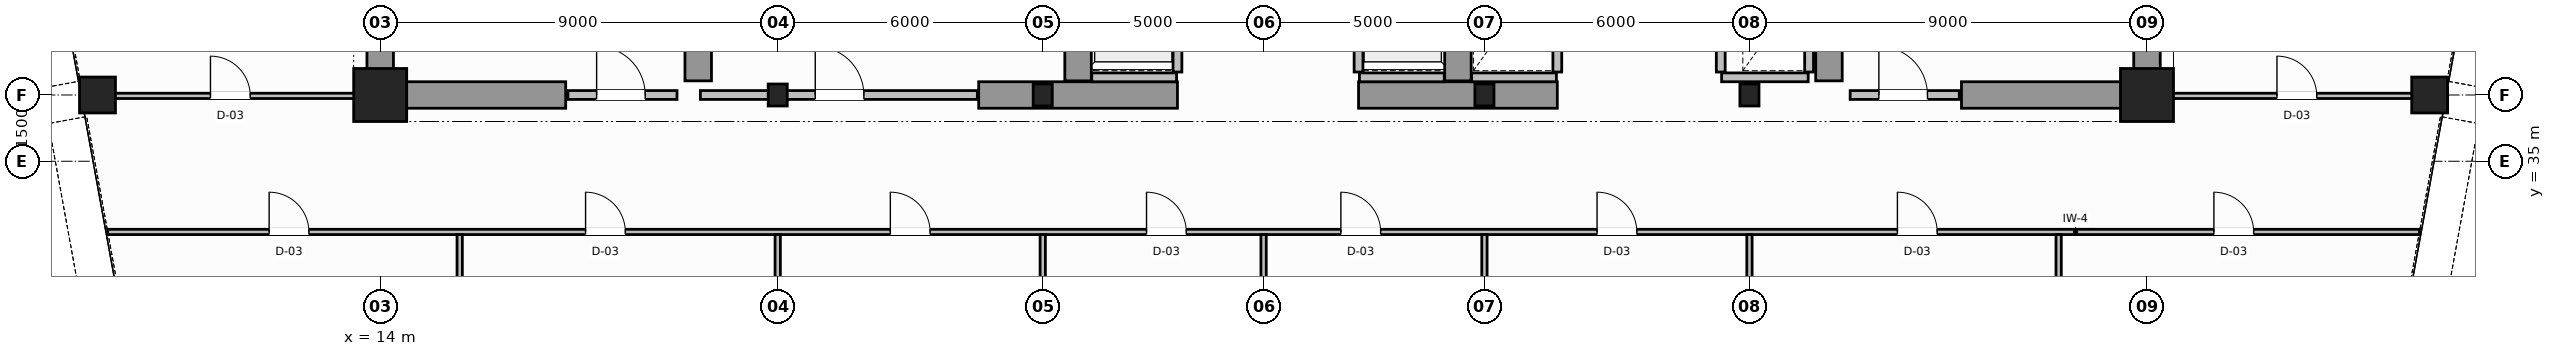
"""IFC4 building model, lengths in metres.
Left out: names, types, materials, properties, quantities, classifications, styles, units other than length and angle.
Written with IfcOpenShell. Run it as: python <this file> out.ifc"""

import sys

from ifc_helpers import new_model, si_unit, direction, frame, frame_2d, origin, origin_2d, place, context, subcontext, project, spatial, rectangle, hollow_circle, i_section, extrude, source, transform, mapped, element, fill, save


model = new_model("IFC4")
c1 = context("Model", 3, precision=1e-05, world=origin(), true_north=direction((0.0, 1.0)))
c2 = subcontext(c1, "Body", "Model", "MODEL_VIEW")
j1 = project(units=[si_unit("LENGTHUNIT", "METRE"), si_unit("PLANEANGLEUNIT", "RADIAN")], contexts=[c1])
p1 = place(None, origin())
s1 = spatial("IfcSite", under=j1, at=p1, CompositionType="ELEMENT")
p2 = place(p1, origin())
s2 = spatial("IfcBuilding", under=s1, at=p2, CompositionType="ELEMENT")
p3 = place(p2, frame((0.0, 0.0, 176.6)))
s3 = spatial("IfcBuildingStorey", under=s2, at=p3, CompositionType="ELEMENT", Elevation=176.6)
m1 = source(origin(), c2, "Body", "SweptSolid", [
    extrude(rectangle(XDim=1.2, YDim=1.2, at=origin_2d()), origin(), (0.0, 0.0, 1.0), 3.8),
])
p4 = place(p3, frame((14.0, 36.5, 0.0), z_axis=(0.0, 0.0, 1.0), x_axis=(1.0, 0.0, 0.0)))
e1 = element("IfcColumn", 1, at=p4, inside=s3, PredefinedType="COLUMN", context=c2, shape_type="MappedRepresentation", body=[
    mapped(m1, transform((0.0, 0.0, 0.0), scale=1.0)),
])
m2 = source(origin(), c2, "Body", "SweptSolid", [
    extrude(i_section(OverallWidth=0.432, OverallDepth=0.498, WebThickness=0.055, FlangeThickness=0.068, FilletRadius=0.015, at=origin_2d()), origin(), (0.0, 0.0, 1.0), 3.8),
])
for number, where, z_axis, x_axis in (
    (2, (23.0, 36.5, 0.0), (0.0, 0.0, 1.0), (1.0, 0.0, 0.0)),
    (3, (29.0, 36.5, 0.0), (0.0, 0.0, 1.0), (1.0, 0.0, 0.0)),
    (4, (39.0, 36.5, 0.0), (0.0, 0.0, 1.0), (1.0, 0.0, 0.0)),
    (5, (45.0, 36.5, 0.0), (0.0, 0.0, 1.0), (1.0, 0.0, 0.0)),
):
    element("IfcColumn", number, at=place(p3, frame(where, z_axis=z_axis, x_axis=x_axis)), inside=s3, PredefinedType="COLUMN", context=c2, shape_type="MappedRepresentation", body=[
        mapped(m2, transform((0.0, 0.0, 0.0), scale=1.0)),
    ])
p5 = place(p3, frame((54.0, 36.5, 0.0), z_axis=(0.0, 0.0, 1.0), x_axis=(1.0, 0.0, 0.0)))
e6 = element("IfcColumn", 6, at=p5, inside=s3, PredefinedType="COLUMN", context=c2, shape_type="MappedRepresentation", body=[
    mapped(m1, transform((0.0, 0.0, 0.0), scale=1.0)),
])
m3 = source(origin(), c2, "Body", "SweptSolid", [
    extrude(hollow_circle(Radius=0.406, WallThickness=0.04, at=origin_2d()), origin(), (0.0, 0.0, 1.0), 3.8),
])
for number, where, z_axis, x_axis in (
    (7, (7.6, 36.5, 0.0), (0.0, 0.0, 1.0), (1.0, 0.0, 0.0)),
    (8, (60.4, 36.5, 0.0), (0.0, 0.0, 1.0), (1.0, 0.0, 0.0)),
):
    element("IfcColumn", number, at=place(p3, frame(where, z_axis=z_axis, x_axis=x_axis)), inside=s3, PredefinedType="COLUMN", context=c2, shape_type="MappedRepresentation", body=[
        mapped(m3, transform((0.0, 0.0, 0.0), scale=1.0)),
    ])
for number, where, z_axis, x_axis in (
    (9, (14.0, 36.5, 0.0), (0.0, 0.0, 1.0), (0.0, 1.0, 0.0)),
    (10, (54.0, 36.5, 0.0), (0.0, 0.0, 1.0), (0.0, 1.0, 0.0)),
):
    element("IfcWall", number, at=place(p3, frame(where, z_axis=z_axis, x_axis=x_axis)), inside=s3, PredefinedType="SHEAR", context=c2, shape_type="SweptSolid", body=[
        extrude(rectangle(XDim=14.5, YDim=0.6, at=frame_2d((7.25, 0.0))), origin(), (0.0, 0.0, 1.0), 3.8),
    ])
p6 = place(p3, frame((14.32, 36.5, 0.0), z_axis=(0.0, 0.0, 1.0), x_axis=(1.0, 0.0, 0.0)))
e11 = element("IfcWall", 11, at=p6, inside=s3, PredefinedType="SHEAR", context=c2, shape_type="SweptSolid", body=[
    extrude(rectangle(XDim=3.88, YDim=0.6, at=frame_2d((1.94, 0.0))), origin(), (0.0, 0.0, 1.0), 2.58),
])
for number, where, z_axis, x_axis in (
    (12, (27.55, 36.5, 0.0), (0.0, 0.0, 1.0), (1.0, 0.0, 0.0)),
    (13, (36.15, 36.5, 0.0), (0.0, 0.0, 1.0), (1.0, 0.0, 0.0)),
):
    element("IfcWall", number, at=place(p3, frame(where, z_axis=z_axis, x_axis=x_axis)), inside=s3, PredefinedType="SHEAR", context=c2, shape_type="SweptSolid", body=[
        extrude(rectangle(XDim=4.5, YDim=0.6, at=frame_2d((2.25, 0.0))), origin(), (0.0, 0.0, 1.0), 3.8),
    ])
p7 = place(p3, frame((49.8, 36.5, 0.0), z_axis=(0.0, 0.0, 1.0), x_axis=(1.0, 0.0, 0.0)))
e14 = element("IfcWall", 14, at=p7, inside=s3, PredefinedType="SHEAR", context=c2, shape_type="SweptSolid", body=[
    extrude(rectangle(XDim=3.88, YDim=0.6, at=frame_2d((1.94, 0.0))), origin(), (0.0, 0.0, 1.0), 2.58),
])
for number, where, z_axis, x_axis in (
    (15, (21.2, 36.82, 0.0), (0.0, 0.0, 1.0), (0.0, 1.0, 0.0)),
    (16, (29.8, 36.82, 0.0), (0.0, 0.0, 1.0), (0.0, 1.0, 0.0)),
    (17, (38.4, 36.82, 0.0), (0.0, 0.0, 1.0), (0.0, 1.0, 0.0)),
    (18, (46.8, 36.82, 0.0), (0.0, 0.0, 1.0), (0.0, 1.0, 0.0)),
):
    element("IfcWall", number, at=place(p3, frame(where, z_axis=z_axis, x_axis=x_axis)), inside=s3, PredefinedType="SHEAR", context=c2, shape_type="SweptSolid", body=[
        extrude(rectangle(XDim=9.38, YDim=0.6, at=frame_2d((4.69, 0.0))), origin(), (0.0, 0.0, 1.0), 3.8),
    ])
p8 = place(p3, frame((18.25, 36.5, 0.0), z_axis=(0.0, 0.0, 1.0), x_axis=(1.0, 0.0, 0.0)))
e19 = element("IfcWall", 19, at=p8, inside=s3, PredefinedType="SOLIDWALL", context=c2, shape_type="SweptSolid", body=[
    extrude(rectangle(XDim=2.47, YDim=0.2, at=frame_2d((1.235, 0.0))), origin(), (0.0, 0.0, 1.0), 2.57),
])
p9 = place(p8, frame((0.65, 0.0, 0.0)))
e20 = element("IfcOpeningElement", 20, at=p9, cuts=e19, PredefinedType="OPENING", context=c2, shape_type="SweptSolid", body=[
    extrude(rectangle(XDim=1.1, YDim=2.15, at=frame_2d((0.55, 1.075))), frame((0.0, 0.11, 0.0), z_axis=(0.0, -1.0, 0.0), x_axis=(1.0, 0.0, 0.0)), (0.0, 0.0, 1.0), 0.22),
])
p10 = place(p3, frame((47.28, 36.5, 0.0), z_axis=(0.0, 0.0, 1.0), x_axis=(1.0, 0.0, 0.0)))
e21 = element("IfcWall", 21, at=p10, inside=s3, PredefinedType="SOLIDWALL", context=c2, shape_type="SweptSolid", body=[
    extrude(rectangle(XDim=2.47, YDim=0.2, at=frame_2d((1.235, 0.0))), origin(), (0.0, 0.0, 1.0), 2.57),
])
p11 = place(p10, frame((0.65, 0.0, 0.0)))
e22 = element("IfcOpeningElement", 22, at=p11, cuts=e21, PredefinedType="OPENING", context=c2, shape_type="SweptSolid", body=[
    extrude(rectangle(XDim=1.1, YDim=2.15, at=frame_2d((0.55, 1.075))), frame((0.0, 0.11, 0.0), z_axis=(0.0, -1.0, 0.0), x_axis=(1.0, 0.0, 0.0)), (0.0, 0.0, 1.0), 0.22),
])
p12 = place(p3, frame((30.11, 36.9, 0.0), z_axis=(0.0, 0.0, 1.0), x_axis=(1.0, 0.0, 0.0)))
e23 = element("IfcWall", 23, at=p12, inside=s3, PredefinedType="SOLIDWALL", context=c2, shape_type="SweptSolid", body=[
    extrude(rectangle(XDim=1.92, YDim=0.2, at=frame_2d((0.96, 0.0))), origin(), (0.0, 0.0, 1.0), 2.37),
])
p13 = place(p3, frame((32.05, 37.02, 0.0), z_axis=(0.0, 0.0, 1.0), x_axis=(0.0, 1.0, 0.0)))
e24 = element("IfcWall", 24, at=p13, inside=s3, PredefinedType="SOLIDWALL", context=c2, shape_type="SweptSolid", body=[
    extrude(rectangle(XDim=2.56, YDim=0.2, at=frame_2d((1.28, 0.0))), origin(), (0.0, 0.0, 1.0), 3.58),
])
p14 = place(p3, frame((36.17, 36.9, 0.0), z_axis=(0.0, 0.0, 1.0), x_axis=(1.0, 0.0, 0.0)))
e25 = element("IfcWall", 25, at=p14, inside=s3, PredefinedType="SOLIDWALL", context=c2, shape_type="SweptSolid", body=[
    extrude(rectangle(XDim=1.92, YDim=0.2, at=frame_2d((0.96, 0.0))), origin(), (0.0, 0.0, 1.0), 2.37),
])
p15 = place(p3, frame((36.15, 37.02, 0.0), z_axis=(0.0, 0.0, 1.0), x_axis=(0.0, 1.0, 0.0)))
e26 = element("IfcWall", 26, at=p15, inside=s3, PredefinedType="SOLIDWALL", context=c2, shape_type="SweptSolid", body=[
    extrude(rectangle(XDim=2.56, YDim=0.2, at=frame_2d((1.28, 0.0))), origin(), (0.0, 0.0, 1.0), 3.58),
])
p16 = place(p3, frame((38.71, 36.9, 0.0), z_axis=(0.0, 0.0, 1.0), x_axis=(1.0, 0.0, 0.0)))
e27 = element("IfcWall", 27, at=p16, inside=s3, PredefinedType="SOLIDWALL", context=c2, shape_type="SweptSolid", body=[
    extrude(rectangle(XDim=1.92, YDim=0.2, at=frame_2d((0.96, 0.0))), origin(), (0.0, 0.0, 1.0), 2.37),
])
p17 = place(p3, frame((40.65, 37.02, 0.0), z_axis=(0.0, 0.0, 1.0), x_axis=(0.0, 1.0, 0.0)))
e28 = element("IfcWall", 28, at=p17, inside=s3, PredefinedType="SOLIDWALL", context=c2, shape_type="SweptSolid", body=[
    extrude(rectangle(XDim=2.56, YDim=0.2, at=frame_2d((1.28, 0.0))), origin(), (0.0, 0.0, 1.0), 3.58),
])
p18 = place(p3, frame((44.37, 36.9, 0.0), z_axis=(0.0, 0.0, 1.0), x_axis=(1.0, 0.0, 0.0)))
e29 = element("IfcWall", 29, at=p18, inside=s3, PredefinedType="SOLIDWALL", context=c2, shape_type="SweptSolid", body=[
    extrude(rectangle(XDim=1.96, YDim=0.2, at=frame_2d((0.98, 0.0))), origin(), (0.0, 0.0, 1.0), 2.37),
])
for number, where, z_axis, x_axis in (
    (30, (44.35, 37.02, 0.0), (0.0, 0.0, 1.0), (0.0, 1.0, 0.0)),
    (31, (46.35, 37.02, 0.0), (0.0, 0.0, 1.0), (0.0, 1.0, 0.0)),
):
    element("IfcWall", number, at=place(p3, frame(where, z_axis=z_axis, x_axis=x_axis)), inside=s3, PredefinedType="SOLIDWALL", context=c2, shape_type="SweptSolid", body=[
        extrude(rectangle(XDim=2.56, YDim=0.2, at=frame_2d((1.28, 0.0))), origin(), (0.0, 0.0, 1.0), 3.58),
    ])
p19 = place(p3, frame((21.25, 36.5, 0.0), z_axis=(0.0, 0.0, 1.0), x_axis=(1.0, 0.0, 0.0)))
e32 = element("IfcWall", 32, at=p19, inside=s3, PredefinedType="SOLIDWALL", context=c2, shape_type="SweptSolid", body=[
    extrude(rectangle(XDim=6.27, YDim=0.2, at=frame_2d((3.135, 0.0))), origin(), (0.0, 0.0, 1.0), 2.37),
])
p20 = place(p19, frame((2.6, 0.0, 0.0)))
e33 = element("IfcOpeningElement", 33, at=p20, cuts=e32, PredefinedType="OPENING", context=c2, shape_type="SweptSolid", body=[
    extrude(rectangle(XDim=1.1, YDim=2.15, at=frame_2d((0.55, 1.075))), frame((0.0, 0.11, 0.0), z_axis=(0.0, -1.0, 0.0), x_axis=(1.0, 0.0, 0.0)), (0.0, 0.0, 1.0), 0.22),
])
p21 = place(p3, frame((7.831, 33.4, 0.0), z_axis=(0.0, 0.0, 1.0), x_axis=(1.0, 0.0, 0.0)))
e34 = element("IfcWall", 34, at=p21, inside=s3, PredefinedType="PARTITIONING", context=c2, shape_type="SweptSolid", body=[
    extrude(rectangle(XDim=52.338, YDim=0.12, at=frame_2d((26.169, 0.0))), origin(), (0.0, 0.0, 1.0), 3.58),
])
p22 = place(p21, frame((3.655, 0.0, 0.0)))
e35 = element("IfcOpeningElement", 35, at=p22, cuts=e34, PredefinedType="OPENING", context=c2, shape_type="SweptSolid", body=[
    extrude(rectangle(XDim=0.9, YDim=2.15, at=frame_2d((0.45, 1.075))), frame((0.0, 0.07, 0.0), z_axis=(0.0, -1.0, 0.0), x_axis=(1.0, 0.0, 0.0)), (0.0, 0.0, 1.0), 0.14),
])
p23 = place(p21, frame((10.819, 0.0, 0.0)))
e36 = element("IfcOpeningElement", 36, at=p23, cuts=e34, PredefinedType="OPENING", context=c2, shape_type="SweptSolid", body=[
    extrude(rectangle(XDim=0.9, YDim=2.15, at=frame_2d((0.45, 1.075))), frame((0.0, 0.07, 0.0), z_axis=(0.0, -1.0, 0.0), x_axis=(1.0, 0.0, 0.0)), (0.0, 0.0, 1.0), 0.14),
])
p24 = place(p21, frame((17.719, 0.0, 0.0)))
e37 = element("IfcOpeningElement", 37, at=p24, cuts=e34, PredefinedType="OPENING", context=c2, shape_type="SweptSolid", body=[
    extrude(rectangle(XDim=0.9, YDim=2.15, at=frame_2d((0.45, 1.075))), frame((0.0, 0.07, 0.0), z_axis=(0.0, -1.0, 0.0), x_axis=(1.0, 0.0, 0.0)), (0.0, 0.0, 1.0), 0.14),
])
p25 = place(p21, frame((23.519, 0.0, 0.0)))
e38 = element("IfcOpeningElement", 38, at=p25, cuts=e34, PredefinedType="OPENING", context=c2, shape_type="SweptSolid", body=[
    extrude(rectangle(XDim=0.9, YDim=2.15, at=frame_2d((0.45, 1.075))), frame((0.0, 0.07, 0.0), z_axis=(0.0, -1.0, 0.0), x_axis=(1.0, 0.0, 0.0)), (0.0, 0.0, 1.0), 0.14),
])
p26 = place(p21, frame((27.919, 0.0, 0.0)))
e39 = element("IfcOpeningElement", 39, at=p26, cuts=e34, PredefinedType="OPENING", context=c2, shape_type="SweptSolid", body=[
    extrude(rectangle(XDim=0.9, YDim=2.15, at=frame_2d((0.45, 1.075))), frame((0.0, 0.07, 0.0), z_axis=(0.0, -1.0, 0.0), x_axis=(1.0, 0.0, 0.0)), (0.0, 0.0, 1.0), 0.14),
])
p27 = place(p21, frame((33.719, 0.0, 0.0)))
e40 = element("IfcOpeningElement", 40, at=p27, cuts=e34, PredefinedType="OPENING", context=c2, shape_type="SweptSolid", body=[
    extrude(rectangle(XDim=0.9, YDim=2.15, at=frame_2d((0.45, 1.075))), frame((0.0, 0.07, 0.0), z_axis=(0.0, -1.0, 0.0), x_axis=(1.0, 0.0, 0.0)), (0.0, 0.0, 1.0), 0.14),
])
p28 = place(p21, frame((40.519, 0.0, 0.0)))
e41 = element("IfcOpeningElement", 41, at=p28, cuts=e34, PredefinedType="OPENING", context=c2, shape_type="SweptSolid", body=[
    extrude(rectangle(XDim=0.9, YDim=2.15, at=frame_2d((0.45, 1.075))), frame((0.0, 0.07, 0.0), z_axis=(0.0, -1.0, 0.0), x_axis=(1.0, 0.0, 0.0)), (0.0, 0.0, 1.0), 0.14),
])
p29 = place(p21, frame((47.684, 0.0, 0.0)))
e42 = element("IfcOpeningElement", 42, at=p29, cuts=e34, PredefinedType="OPENING", context=c2, shape_type="SweptSolid", body=[
    extrude(rectangle(XDim=0.9, YDim=2.15, at=frame_2d((0.45, 1.075))), frame((0.0, 0.07, 0.0), z_axis=(0.0, -1.0, 0.0), x_axis=(1.0, 0.0, 0.0)), (0.0, 0.0, 1.0), 0.14),
])
p30 = place(p3, frame((7.274, 36.48, 0.0), z_axis=(0.0, 0.0, 1.0), x_axis=(1.0, 0.0, 0.0)))
e43 = element("IfcWall", 43, at=p30, inside=s3, PredefinedType="PARTITIONING", context=c2, shape_type="SweptSolid", body=[
    extrude(rectangle(XDim=6.666, YDim=0.12, at=frame_2d((3.333, 0.0))), origin(), (0.0, 0.0, 1.0), 2.37),
])
p31 = place(p30, frame((2.883, 0.0, 0.0)))
e44 = element("IfcOpeningElement", 44, at=p31, cuts=e43, PredefinedType="OPENING", context=c2, shape_type="SweptSolid", body=[
    extrude(rectangle(XDim=0.9, YDim=2.15, at=frame_2d((0.45, 1.075))), frame((0.0, 0.07, 0.0), z_axis=(0.0, -1.0, 0.0), x_axis=(1.0, 0.0, 0.0)), (0.0, 0.0, 1.0), 0.14),
])
p32 = place(p3, frame((54.06, 36.48, 0.0), z_axis=(0.0, 0.0, 1.0), x_axis=(1.0, 0.0, 0.0)))
e45 = element("IfcWall", 45, at=p32, inside=s3, PredefinedType="PARTITIONING", context=c2, shape_type="SweptSolid", body=[
    extrude(rectangle(XDim=6.666, YDim=0.12, at=frame_2d((3.333, 0.0))), origin(), (0.0, 0.0, 1.0), 2.37),
])
p33 = place(p32, frame((2.883, 0.0, 0.0)))
e46 = element("IfcOpeningElement", 46, at=p33, cuts=e45, PredefinedType="OPENING", context=c2, shape_type="SweptSolid", body=[
    extrude(rectangle(XDim=0.9, YDim=2.15, at=frame_2d((0.45, 1.075))), frame((0.0, 0.07, 0.0), z_axis=(0.0, -1.0, 0.0), x_axis=(1.0, 0.0, 0.0)), (0.0, 0.0, 1.0), 0.14),
])
for number, where, z_axis, x_axis in (
    (47, (23.0, 28.14, 0.0), (0.0, 0.0, 1.0), (0.0, 1.0, 0.0)),
    (48, (29.0, 28.14, 0.0), (0.0, 0.0, 1.0), (0.0, 1.0, 0.0)),
    (49, (39.0, 28.14, 0.0), (0.0, 0.0, 1.0), (0.0, 1.0, 0.0)),
    (50, (45.0, 28.14, 0.0), (0.0, 0.0, 1.0), (0.0, 1.0, 0.0)),
):
    element("IfcWall", number, at=place(p3, frame(where, z_axis=z_axis, x_axis=x_axis)), inside=s3, PredefinedType="PARTITIONING", context=c2, shape_type="SweptSolid", body=[
        extrude(rectangle(XDim=5.2, YDim=0.12, at=frame_2d((2.6, 0.0))), origin(), (0.0, 0.0, 1.0), 2.37),
    ])
p34 = place(p3, frame((15.8, 18.64, 0.0), z_axis=(0.0, 0.0, 1.0), x_axis=(0.0, 1.0, 0.0)))
e51 = element("IfcWall", 51, at=p34, inside=s3, PredefinedType="PARTITIONING", context=c2, shape_type="SweptSolid", body=[
    extrude(rectangle(XDim=14.7, YDim=0.12, at=frame_2d((7.35, 0.0))), origin(), (0.0, 0.0, 1.0), 3.58),
])
p35 = place(p3, frame((34.0, 7.64, 0.0), z_axis=(0.0, 0.0, 1.0), x_axis=(0.0, 1.0, 0.0)))
e52 = element("IfcWall", 52, at=p35, inside=s3, PredefinedType="PARTITIONING", context=c2, shape_type="SweptSolid", body=[
    extrude(rectangle(XDim=25.7, YDim=0.12, at=frame_2d((12.85, 0.0))), origin(), (0.0, 0.0, 1.0), 3.58),
])
p36 = place(p3, frame((52.0, 18.64, 0.0), z_axis=(0.0, 0.0, 1.0), x_axis=(0.0, 1.0, 0.0)))
e53 = element("IfcWall", 53, at=p36, inside=s3, PredefinedType="PARTITIONING", context=c2, shape_type="SweptSolid", body=[
    extrude(rectangle(XDim=14.7, YDim=0.12, at=frame_2d((7.35, 0.0))), origin(), (0.0, 0.0, 1.0), 3.58),
])
m4 = source(origin(), c2, "Body", "SweptSolid", [
    extrude(rectangle(XDim=1.1, YDim=2.15, at=frame_2d((0.55, 1.075))), frame((0.0, 0.025, 0.0), z_axis=(0.0, -1.0, 0.0), x_axis=(1.0, 0.0, 0.0)), (0.0, 0.0, 1.0), 0.05),
])
p37 = place(p9, origin())
e54 = element("IfcDoor", 54, at=p37, inside=s3, OperationType="SINGLE_SWING_RIGHT", PredefinedType="DOOR", context=c2, shape_type="MappedRepresentation", body=[
    mapped(m4, transform((0.0, 0.0, 0.0), scale=1.0)),
])
fill(e20, e54)
p38 = place(p11, origin())
e55 = element("IfcDoor", 55, at=p38, inside=s3, OperationType="SINGLE_SWING_LEFT", PredefinedType="DOOR", context=c2, shape_type="MappedRepresentation", body=[
    mapped(m4, transform((0.0, 0.0, 0.0), scale=1.0)),
])
fill(e22, e55)
p39 = place(p20, origin())
e56 = element("IfcDoor", 56, at=p39, inside=s3, OperationType="SINGLE_SWING_LEFT", PredefinedType="DOOR", context=c2, shape_type="MappedRepresentation", body=[
    mapped(m4, transform((0.0, 0.0, 0.0), scale=1.0)),
])
fill(e33, e56)
m5 = source(origin(), c2, "Body", "SweptSolid", [
    extrude(rectangle(XDim=0.9, YDim=2.15, at=frame_2d((0.45, 1.075))), frame((0.0, 0.025, 0.0), z_axis=(0.0, -1.0, 0.0), x_axis=(1.0, 0.0, 0.0)), (0.0, 0.0, 1.0), 0.05),
])
p40 = place(p31, origin())
e57 = element("IfcDoor", 57, at=p40, inside=s3, OperationType="SINGLE_SWING_LEFT", PredefinedType="DOOR", context=c2, shape_type="MappedRepresentation", body=[
    mapped(m5, transform((0.0, 0.0, 0.0), scale=1.0)),
])
fill(e44, e57)
p41 = place(p33, origin())
e58 = element("IfcDoor", 58, at=p41, inside=s3, OperationType="SINGLE_SWING_RIGHT", PredefinedType="DOOR", context=c2, shape_type="MappedRepresentation", body=[
    mapped(m5, transform((0.0, 0.0, 0.0), scale=1.0)),
])
fill(e46, e58)
p42 = place(p22, origin())
e59 = element("IfcDoor", 59, at=p42, inside=s3, OperationType="SINGLE_SWING_LEFT", PredefinedType="DOOR", context=c2, shape_type="MappedRepresentation", body=[
    mapped(m5, transform((0.0, 0.0, 0.0), scale=1.0)),
])
fill(e35, e59)
p43 = place(p23, origin())
e60 = element("IfcDoor", 60, at=p43, inside=s3, OperationType="SINGLE_SWING_RIGHT", PredefinedType="DOOR", context=c2, shape_type="MappedRepresentation", body=[
    mapped(m5, transform((0.0, 0.0, 0.0), scale=1.0)),
])
fill(e36, e60)
p44 = place(p24, origin())
e61 = element("IfcDoor", 61, at=p44, inside=s3, OperationType="SINGLE_SWING_LEFT", PredefinedType="DOOR", context=c2, shape_type="MappedRepresentation", body=[
    mapped(m5, transform((0.0, 0.0, 0.0), scale=1.0)),
])
fill(e37, e61)
p45 = place(p25, origin())
e62 = element("IfcDoor", 62, at=p45, inside=s3, OperationType="SINGLE_SWING_RIGHT", PredefinedType="DOOR", context=c2, shape_type="MappedRepresentation", body=[
    mapped(m5, transform((0.0, 0.0, 0.0), scale=1.0)),
])
fill(e38, e62)
p46 = place(p26, origin())
e63 = element("IfcDoor", 63, at=p46, inside=s3, OperationType="SINGLE_SWING_LEFT", PredefinedType="DOOR", context=c2, shape_type="MappedRepresentation", body=[
    mapped(m5, transform((0.0, 0.0, 0.0), scale=1.0)),
])
fill(e39, e63)
p47 = place(p27, origin())
e64 = element("IfcDoor", 64, at=p47, inside=s3, OperationType="SINGLE_SWING_RIGHT", PredefinedType="DOOR", context=c2, shape_type="MappedRepresentation", body=[
    mapped(m5, transform((0.0, 0.0, 0.0), scale=1.0)),
])
fill(e40, e64)
p48 = place(p28, origin())
e65 = element("IfcDoor", 65, at=p48, inside=s3, OperationType="SINGLE_SWING_LEFT", PredefinedType="DOOR", context=c2, shape_type="MappedRepresentation", body=[
    mapped(m5, transform((0.0, 0.0, 0.0), scale=1.0)),
])
fill(e41, e65)
p49 = place(p29, origin())
e66 = element("IfcDoor", 66, at=p49, inside=s3, OperationType="SINGLE_SWING_RIGHT", PredefinedType="DOOR", context=c2, shape_type="MappedRepresentation", body=[
    mapped(m5, transform((0.0, 0.0, 0.0), scale=1.0)),
])
fill(e42, e66)
save(model, sys.argv[1])
